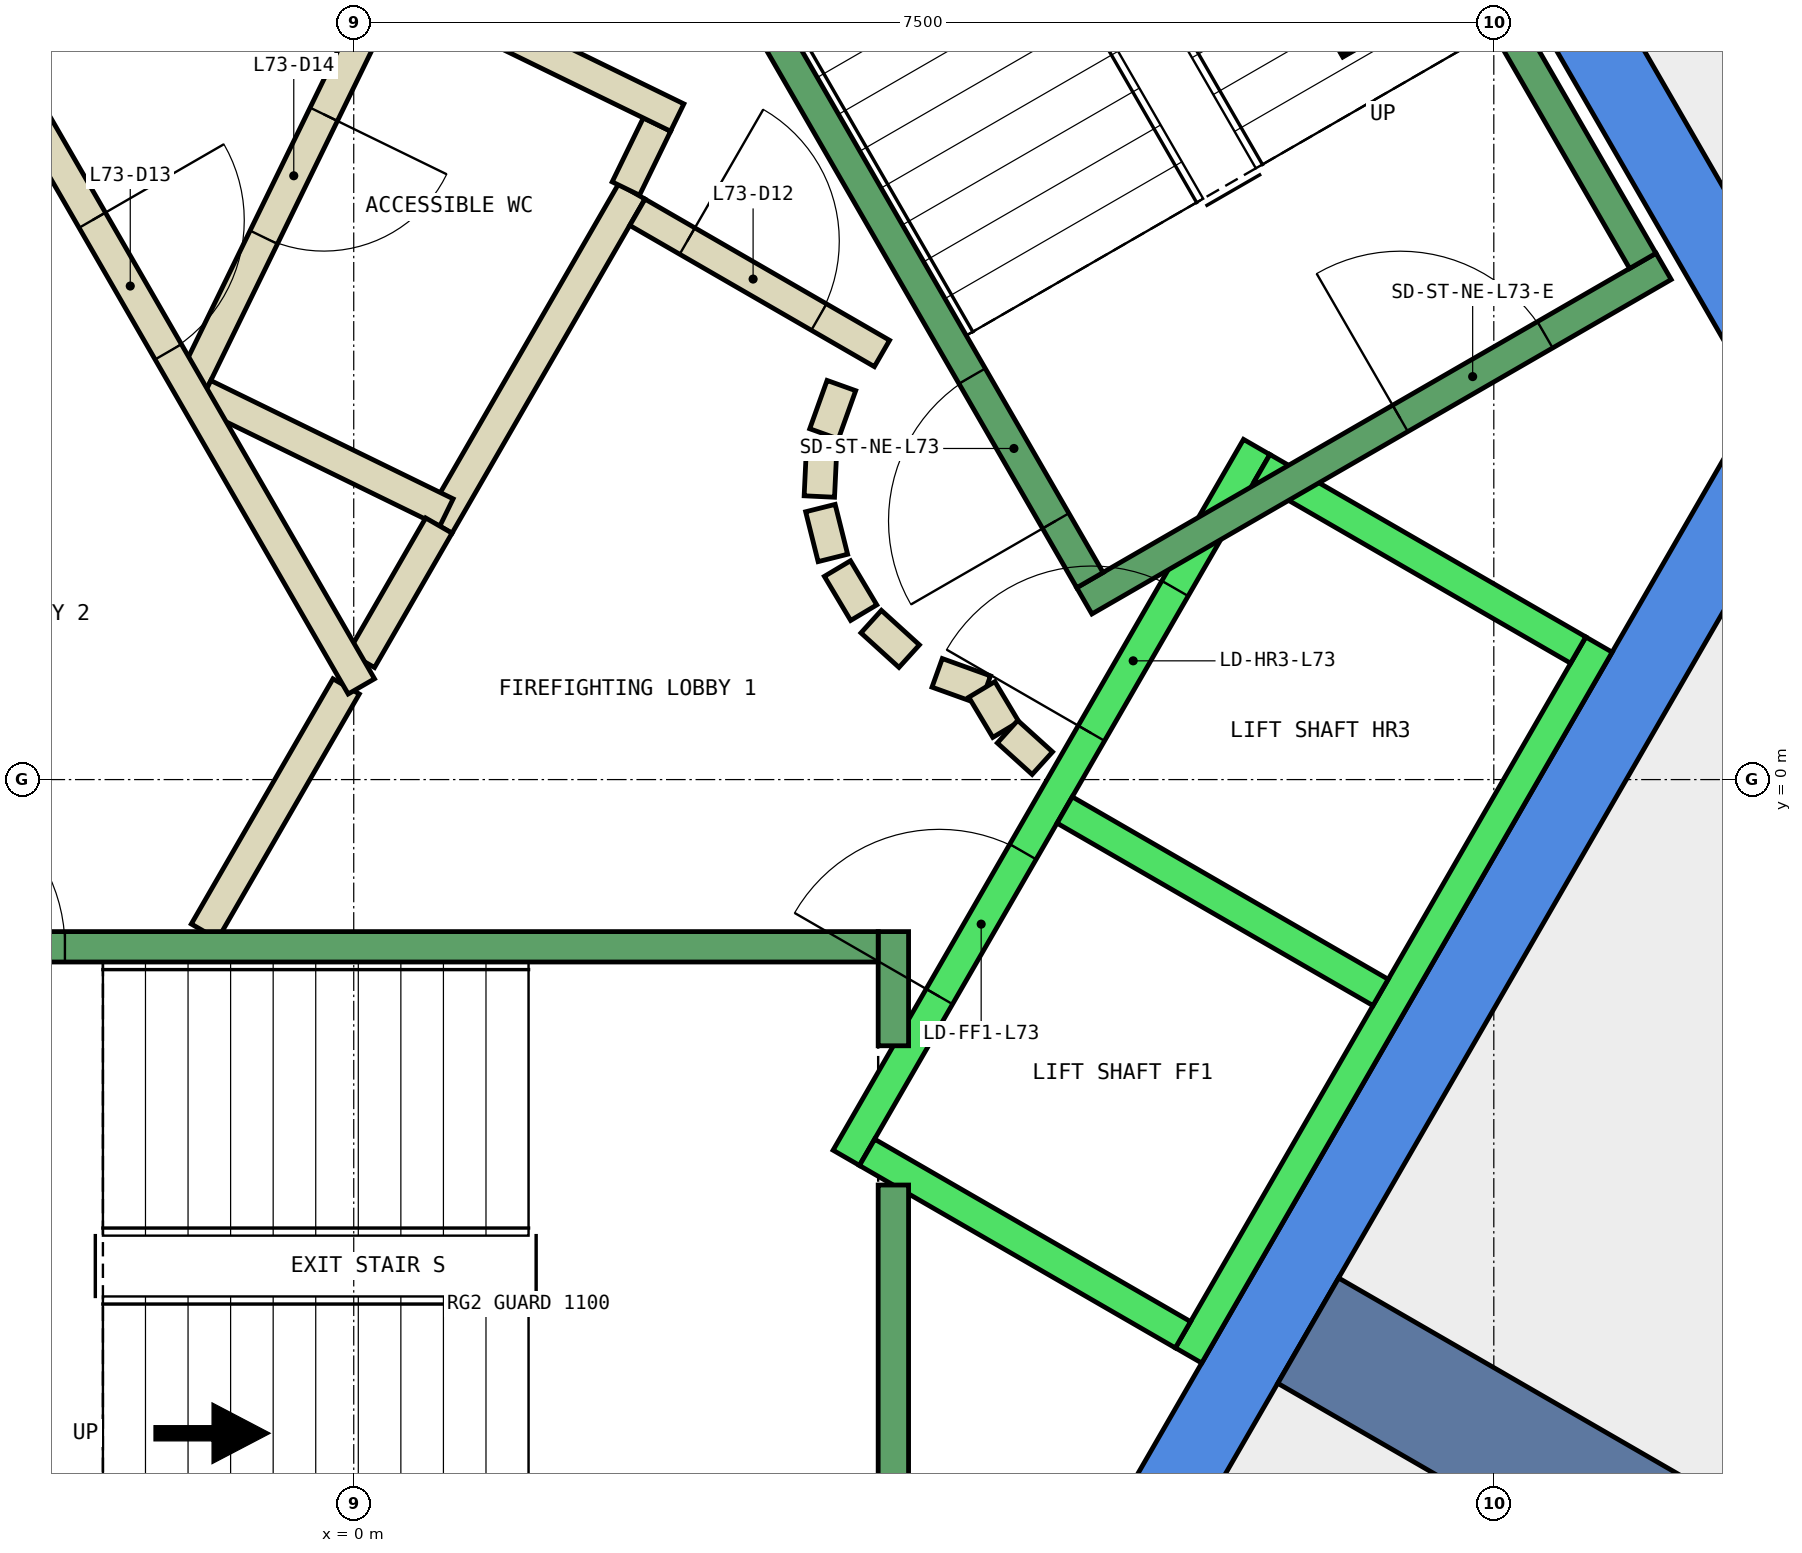
"""IFC4 building model, lengths in metres.
Left out: names, types, materials, properties, quantities, classifications, styles, units other than length and angle.
Written with IfcOpenShell. Run it as: python <this file> out.ifc"""

import sys

from ifc_helpers import new_model, si_unit, direction, frame, frame_2d, origin, place, context, subcontext, project, spatial, polyline, rectangle, outline, extrude, element, fill, save


model = new_model("IFC4")
c1 = context("Model", 3, precision=1e-05, world=origin(), true_north=direction((0.0, 1.0)))
c2 = subcontext(c1, "Body", "Model", "MODEL_VIEW")
j1 = project(units=[si_unit("LENGTHUNIT", "METRE"), si_unit("PLANEANGLEUNIT", "RADIAN")], contexts=[c1])
p1 = place(None, origin())
s1 = spatial("IfcSite", under=j1, at=p1, CompositionType="ELEMENT")
p2 = place(p1, origin())
s2 = spatial("IfcBuilding", under=s1, at=p2, CompositionType="ELEMENT")
p3 = place(p2, frame((0.0, 0.0, 311.6)))
s3 = spatial("IfcBuildingStorey", under=s2, at=p3, CompositionType="ELEMENT", Elevation=311.6)
p4 = place(p3, frame((0.0, 0.0, -0.34)))
e1 = element("IfcWall", 1, at=p4, inside=s3, PredefinedType="SHEAR", context=c2, shape_type="SweptSolid", body=[
    extrude(outline(polyline([(5.486, 9.998), (5.053, 9.748), (9.238, 2.5), (9.815, 2.5), (5.486, 9.998)])), origin(), (0.0, 0.0, 1.0), 3.6),
])
p5 = place(p3, frame((0.0, 0.0, -0.34)))
e2 = element("IfcWall", 2, at=p5, inside=s3, PredefinedType="SHEAR", context=c2, shape_type="SweptSolid", body=[
    extrude(outline(polyline([(4.907, -6.0), (9.815, 2.5), (9.238, 2.5), (4.619, -5.5), (4.907, -6.0)])), origin(), (0.0, 0.0, 1.0), 3.6),
])
p6 = place(p3, frame((6.279, -3.625, -0.34), z_axis=(0.0, 0.0, 1.0), x_axis=(0.866017533419, -0.500013631625, 0.0)))
e3 = element("IfcWall", 3, at=p6, inside=s3, PredefinedType="SHEAR", context=c2, shape_type="SweptSolid", body=[
    extrude(rectangle(XDim=9.0, YDim=0.8, at=frame_2d((4.5, 0.0))), origin(), (0.0, 0.0, 1.0), 3.6),
])
p7 = place(p3, frame((0.56, 1.671, 0.0), z_axis=(0.0, 0.0, 1.0), x_axis=(0.500008334558, 0.866020591771, 0.0)))
e4 = element("IfcWall", 4, at=p7, inside=s3, PredefinedType="PARTITIONING", context=c2, shape_type="SweptSolid", body=[
    extrude(rectangle(XDim=2.538, YDim=0.2, at=frame_2d((1.269, 0.0))), origin(), (0.0, 0.0, 1.0), 3.26),
])
p8 = place(p3, frame((1.79, 3.888, 0.0), z_axis=(0.0, 0.0, 1.0), x_axis=(0.437807406823, 0.899068781869, 0.0)))
e5 = element("IfcWall", 5, at=p8, inside=s3, PredefinedType="PARTITIONING", context=c2, shape_type="SweptSolid", body=[
    extrude(rectangle(XDim=0.469, YDim=0.2, at=frame_2d((0.234, 0.0))), origin(), (0.0, 0.0, 1.0), 3.26),
])
p9 = place(p3, frame((2.128, 4.355, 0.0), z_axis=(0.0, 0.0, 1.0), x_axis=(-0.898876404494, 0.438202247191, 0.0)))
e6 = element("IfcWall", 6, at=p9, inside=s3, PredefinedType="PARTITIONING", context=c2, shape_type="SweptSolid", body=[
    extrude(rectangle(XDim=1.999, YDim=0.2, at=frame_2d((1.0, 0.0))), origin(), (0.0, 0.0, 1.0), 3.26),
])
p10 = place(p3, frame((0.285, 5.365, 0.0), z_axis=(0.0, 0.0, 1.0), x_axis=(-0.43840190643, -0.898779043168, 0.0)))
e7 = element("IfcWall", 7, at=p10, inside=s3, PredefinedType="PARTITIONING", context=c2, shape_type="SweptSolid", body=[
    extrude(rectangle(XDim=3.1, YDim=0.2, at=frame_2d((1.55, 0.0))), origin(), (0.0, 0.0, 1.0), 3.26),
])
p11 = place(p10, frame((1.1, 0.0, 0.0)))
e8 = element("IfcOpeningElement", 8, at=p11, cuts=e7, PredefinedType="OPENING", context=c2, shape_type="SweptSolid", body=[
    extrude(rectangle(XDim=0.9, YDim=2.1, at=frame_2d((0.45, 1.05))), frame((0.0, 0.11, 0.0), z_axis=(0.0, -1.0, 0.0), x_axis=(1.0, 0.0, 0.0)), (0.0, 0.0, 1.0), 0.22),
])
p12 = place(p3, frame((-0.984, 2.535, 0.0), z_axis=(0.0, 0.0, 1.0), x_axis=(0.898707583217, -0.438548378025, 0.0)))
e9 = element("IfcWall", 9, at=p12, inside=s3, PredefinedType="PARTITIONING", context=c2, shape_type="SweptSolid", body=[
    extrude(rectangle(XDim=1.774, YDim=0.2, at=frame_2d((0.887, 0.0))), origin(), (0.0, 0.0, 1.0), 3.26),
])
p13 = place(p3, frame((8.588, 9.665, 0.0), z_axis=(0.0, 0.0, 1.0), x_axis=(0.499946799636, -0.86605611685, 0.0)))
e10 = element("IfcWall", 10, at=p13, inside=s3, PredefinedType="PARTITIONING", context=c2, shape_type="SweptSolid", body=[
    extrude(rectangle(XDim=8.227, YDim=0.2, at=frame_2d((4.114, 0.0))), origin(), (0.0, 0.0, 1.0), 3.26),
])
p14 = place(p13, frame((3.613, 0.0, 0.0)))
e11 = element("IfcOpeningElement", 11, at=p14, cuts=e10, PredefinedType="OPENING", context=c2, shape_type="SweptSolid", body=[
    extrude(rectangle(XDim=1.0, YDim=2.1, at=frame_2d((0.5, 1.05))), frame((0.0, 0.11, 0.0), z_axis=(0.0, -1.0, 0.0), x_axis=(1.0, 0.0, 0.0)), (0.0, 0.0, 1.0), 0.22),
])
p15 = place(p3, frame((-0.982, -1.0, 0.0), z_axis=(0.0, 0.0, 1.0), x_axis=(0.50024047865, 0.865886518847, 0.0)))
e12 = element("IfcWall", 12, at=p15, inside=s3, PredefinedType="PARTITIONING", context=c2, shape_type="SweptSolid", body=[
    extrude(rectangle(XDim=1.863, YDim=0.2, at=frame_2d((0.931, 0.0))), origin(), (0.0, 0.0, 1.0), 3.26),
])
p16 = place(p3, frame((0.05, 0.787, 0.0), z_axis=(0.0, 0.0, 1.0), x_axis=(0.499819111317, 0.866129814729, 0.0)))
e13 = element("IfcWall", 13, at=p16, inside=s3, PredefinedType="PARTITIONING", context=c2, shape_type="SweptSolid", body=[
    extrude(rectangle(XDim=1.021, YDim=0.2, at=frame_2d((0.51, 0.0))), origin(), (0.0, 0.0, 1.0), 3.26),
])
p17 = place(p3, frame((1.866, 3.732, 0.0), z_axis=(0.0, 0.0, 1.0), x_axis=(0.866043361281, -0.499968895414, 0.0)))
e14 = element("IfcWall", 14, at=p17, inside=s3, PredefinedType="PARTITIONING", context=c2, shape_type="SweptSolid", body=[
    extrude(rectangle(XDim=1.858, YDim=0.2, at=frame_2d((0.929, 0.0))), origin(), (0.0, 0.0, 1.0), 3.26),
])
p18 = place(p17, frame((0.379, 0.0, 0.0)))
e15 = element("IfcOpeningElement", 15, at=p18, cuts=e14, PredefinedType="OPENING", context=c2, shape_type="SweptSolid", body=[
    extrude(rectangle(XDim=1.0, YDim=2.1, at=frame_2d((0.5, 1.05))), frame((0.0, 0.11, 0.0), z_axis=(0.0, -1.0, 0.0), x_axis=(1.0, 0.0, 0.0)), (0.0, 0.0, 1.0), 0.22),
])
p19 = place(p3, frame((3.208, 2.592, 0.0), z_axis=(0.0, 0.0, 1.0), x_axis=(-0.337388820924, -0.941365382578, 0.0)))
e16 = element("IfcWall", 16, at=p19, inside=s3, PredefinedType="PARTITIONING", context=c2, shape_type="SweptSolid", body=[
    extrude(rectangle(XDim=0.338, YDim=0.2, at=frame_2d((0.169, 0.0))), origin(), (0.0, 0.0, 1.0), 3.26),
])
p20 = place(p3, frame((3.079, 2.199, 0.0), z_axis=(0.0, 0.0, 1.0), x_axis=(-0.047771483479, -0.998858290933, 0.0)))
e17 = element("IfcWall", 17, at=p20, inside=s3, PredefinedType="PARTITIONING", context=c2, shape_type="SweptSolid", body=[
    extrude(rectangle(XDim=0.337, YDim=0.2, at=frame_2d((0.169, 0.0))), origin(), (0.0, 0.0, 1.0), 3.26),
])
p21 = place(p3, frame((3.07, 1.786, 0.0), z_axis=(0.0, 0.0, 1.0), x_axis=(0.242705583207, -0.970099994784, 0.0)))
e18 = element("IfcWall", 18, at=p21, inside=s3, PredefinedType="PARTITIONING", context=c2, shape_type="SweptSolid", body=[
    extrude(rectangle(XDim=0.338, YDim=0.2, at=frame_2d((0.169, 0.0))), origin(), (0.0, 0.0, 1.0), 3.26),
])
for number, where, z_axis, x_axis in (
    (19, (3.182, 1.388, 0.0), (0.0, 0.0, 1.0), (0.512, -0.859, 0.0)),
    (20, (3.404, 1.039, 0.0), (0.0, 0.0, 1.0), (0.74, -0.672, 0.0)),
):
    element("IfcWall", number, at=place(p3, frame(where, z_axis=z_axis, x_axis=x_axis)), inside=s3, PredefinedType="PARTITIONING", context=c2, shape_type="SweptSolid", body=[
        extrude(rectangle(XDim=0.338, YDim=0.2, at=frame_2d((0.169, 0.0))), origin(), (0.0, 0.0, 1.0), 3.26),
    ])
p22 = place(p3, frame((3.838, 0.702, 0.0), z_axis=(0.0, 0.0, 1.0), x_axis=(0.941035081519, -0.338308993895, 0.0)))
e21 = element("IfcWall", 21, at=p22, inside=s3, PredefinedType="PARTITIONING", context=c2, shape_type="SweptSolid", body=[
    extrude(rectangle(XDim=0.337, YDim=0.2, at=frame_2d((0.168, 0.0))), origin(), (0.0, 0.0, 1.0), 3.26),
])
p23 = place(p3, frame((4.132, 0.593, 0.0), z_axis=(0.0, 0.0, 1.0), x_axis=(0.513561617048, -0.858052717201, 0.0)))
e22 = element("IfcWall", 22, at=p23, inside=s3, PredefinedType="PARTITIONING", context=c2, shape_type="SweptSolid", body=[
    extrude(rectangle(XDim=0.308, YDim=0.2, at=frame_2d((0.154, 0.0))), origin(), (0.0, 0.0, 1.0), 3.26),
])
p24 = place(p3, frame((4.301, 0.315, 0.0), z_axis=(0.0, 0.0, 1.0), x_axis=(0.741798017506, -0.670623367639, 0.0)))
e23 = element("IfcWall", 23, at=p24, inside=s3, PredefinedType="PARTITIONING", context=c2, shape_type="SweptSolid", body=[
    extrude(rectangle(XDim=0.309, YDim=0.2, at=frame_2d((0.154, 0.0))), origin(), (0.0, 0.0, 1.0), 3.26),
])
p25 = place(p3, frame((-2.54, 5.1, 0.0), z_axis=(0.0, 0.0, 1.0), x_axis=(0.499925051871, -0.866068670783, 0.0)))
e24 = element("IfcWall", 24, at=p25, inside=s3, PredefinedType="PARTITIONING", context=c2, shape_type="SweptSolid", body=[
    extrude(rectangle(XDim=5.181, YDim=0.2, at=frame_2d((2.59, 0.0))), origin(), (0.0, 0.0, 1.0), 3.26),
])
p26 = place(p25, frame((1.64, 0.0, 0.0)))
e25 = element("IfcOpeningElement", 25, at=p26, cuts=e24, PredefinedType="OPENING", context=c2, shape_type="SweptSolid", body=[
    extrude(rectangle(XDim=1.0, YDim=2.1, at=frame_2d((0.5, 1.05))), frame((0.0, 0.11, 0.0), z_axis=(0.0, -1.0, 0.0), x_axis=(1.0, 0.0, 0.0)), (0.0, 0.0, 1.0), 0.22),
])
p27 = place(p3, frame((3.24, -2.488, 0.0), z_axis=(0.0, 0.0, 1.0), x_axis=(0.500034260056, 0.866005622828, 0.0)))
e26 = element("IfcWall", 26, at=p27, inside=s3, PredefinedType="STANDARD", context=c2, shape_type="SweptSolid", body=[
    extrude(rectangle(XDim=5.399, YDim=0.2, at=frame_2d((2.7, 0.0))), origin(), (0.0, 0.0, 1.0), 3.26),
])
p28 = place(p27, frame((3.225, 0.0, 0.0)))
e27 = element("IfcOpeningElement", 27, at=p28, cuts=e26, PredefinedType="OPENING", context=c2, shape_type="SweptSolid", body=[
    extrude(rectangle(XDim=1.1, YDim=2.1, at=frame_2d((0.55, 1.05))), frame((0.0, 0.11, 0.0), z_axis=(0.0, -1.0, 0.0), x_axis=(1.0, 0.0, 0.0)), (0.0, 0.0, 1.0), 0.22),
])
p29 = place(p27, frame((1.225, 0.0, 0.0)))
e28 = element("IfcOpeningElement", 28, at=p29, cuts=e26, PredefinedType="OPENING", context=c2, shape_type="SweptSolid", body=[
    extrude(rectangle(XDim=1.1, YDim=2.1, at=frame_2d((0.55, 1.05))), frame((0.0, 0.11, 0.0), z_axis=(0.0, -1.0, 0.0), x_axis=(1.0, 0.0, 0.0)), (0.0, 0.0, 1.0), 0.22),
])
p30 = place(p3, frame((5.492, -3.788, 0.0), z_axis=(0.0, 0.0, 1.0), x_axis=(0.500034260056, 0.866005622828, 0.0)))
e29 = element("IfcWall", 29, at=p30, inside=s3, PredefinedType="STANDARD", context=c2, shape_type="SweptSolid", body=[
    extrude(rectangle(XDim=5.399, YDim=0.2, at=frame_2d((2.7, 0.0))), origin(), (0.0, 0.0, 1.0), 3.26),
])
p31 = place(p3, frame((3.377, -2.452, 0.0), z_axis=(0.0, 0.0, 1.0), x_axis=(0.865955154139, -0.50012165622, 0.0)))
e30 = element("IfcWall", 30, at=p31, inside=s3, PredefinedType="STANDARD", context=c2, shape_type="SweptSolid", body=[
    extrude(rectangle(XDim=2.4, YDim=0.2, at=frame_2d((1.2, 0.0))), origin(), (0.0, 0.0, 1.0), 3.26),
])
for number, where, z_axis, x_axis in (
    (31, (4.677, -0.2, 0.0), (0.0, 0.0, 1.0), (0.866, -0.5, 0.0)),
    (32, (5.977, 2.052, 0.0), (0.0, 0.0, 1.0), (0.866, -0.5, 0.0)),
):
    element("IfcWall", number, at=place(p3, frame(where, z_axis=z_axis, x_axis=x_axis)), inside=s3, PredefinedType="STANDARD", context=c2, shape_type="SweptSolid", body=[
        extrude(rectangle(XDim=2.399, YDim=0.2, at=frame_2d((1.2, 0.0))), origin(), (0.0, 0.0, 1.0), 3.26),
    ])
p32 = place(p3, frame((3.55, -2.667, 0.0), z_axis=(0.0, 0.0, 1.0), x_axis=(0.0, -1.0, 0.0)))
e33 = element("IfcWall", 33, at=p32, inside=s3, PredefinedType="STANDARD", context=c2, shape_type="SweptSolid", body=[
    extrude(rectangle(XDim=2.733, YDim=0.2, at=frame_2d((1.366, 0.0))), origin(), (0.0, 0.0, 1.0), 3.26),
])
p33 = place(p3, frame((3.55, -1.0, 0.0), z_axis=(0.0, 0.0, 1.0), x_axis=(0.0, -1.0, 0.0)))
e34 = element("IfcWall", 34, at=p33, inside=s3, PredefinedType="STANDARD", context=c2, shape_type="SweptSolid", body=[
    extrude(rectangle(XDim=0.751, YDim=0.2, at=frame_2d((0.375, 0.0))), origin(), (0.0, 0.0, 1.0), 3.26),
])
p34 = place(p3, frame((-3.45, -1.1, 0.0), z_axis=(0.0, 0.0, 1.0), x_axis=(1.0, 0.0, 0.0)))
e35 = element("IfcWall", 35, at=p34, inside=s3, PredefinedType="STANDARD", context=c2, shape_type="SweptSolid", body=[
    extrude(rectangle(XDim=6.9, YDim=0.2, at=frame_2d((3.45, 0.0))), origin(), (0.0, 0.0, 1.0), 3.26),
])
p35 = place(p34, frame((0.45, 0.0, 0.0)))
e36 = element("IfcOpeningElement", 36, at=p35, cuts=e35, PredefinedType="OPENING", context=c2, shape_type="SweptSolid", body=[
    extrude(rectangle(XDim=1.1, YDim=2.2, at=frame_2d((0.55, 1.1))), frame((0.0, 0.11, 0.0), z_axis=(0.0, -1.0, 0.0), x_axis=(1.0, 0.0, 0.0)), (0.0, 0.0, 1.0), 0.22),
])
p36 = place(p3, frame((4.806, 1.176, 0.0), z_axis=(0.0, 0.0, 1.0), x_axis=(0.866059941101, 0.499940174841, 0.0)))
e37 = element("IfcWall", 37, at=p36, inside=s3, PredefinedType="STANDARD", context=c2, shape_type="SweptSolid", body=[
    extrude(rectangle(XDim=4.4, YDim=0.2, at=frame_2d((2.2, 0.0))), origin(), (0.0, 0.0, 1.0), 3.26),
])
p37 = place(p36, frame((2.4, 0.0, 0.0)))
e38 = element("IfcOpeningElement", 38, at=p37, cuts=e37, PredefinedType="OPENING", context=c2, shape_type="SweptSolid", body=[
    extrude(rectangle(XDim=1.1, YDim=2.2, at=frame_2d((0.55, 1.1))), frame((0.0, 0.11, 0.0), z_axis=(0.0, -1.0, 0.0), x_axis=(1.0, 0.0, 0.0)), (0.0, 0.0, 1.0), 0.22),
])
p38 = place(p3, frame((4.843, 1.312, 0.0), z_axis=(0.0, 0.0, 1.0), x_axis=(-0.499963383562, 0.866046543262, 0.0)))
e39 = element("IfcWall", 39, at=p38, inside=s3, PredefinedType="STANDARD", context=c2, shape_type="SweptSolid", body=[
    extrude(rectangle(XDim=6.9, YDim=0.2, at=frame_2d((3.45, 0.0))), origin(), (0.0, 0.0, 1.0), 3.26),
])
p39 = place(p38, frame((0.45, 0.0, 0.0)))
e40 = element("IfcOpeningElement", 40, at=p39, cuts=e39, PredefinedType="OPENING", context=c2, shape_type="SweptSolid", body=[
    extrude(rectangle(XDim=1.1, YDim=2.2, at=frame_2d((0.55, 1.1))), frame((0.0, 0.11, 0.0), z_axis=(0.0, -1.0, 0.0), x_axis=(1.0, 0.0, 0.0)), (0.0, 0.0, 1.0), 0.22),
])
p40 = place(p3, frame((8.48, 3.412, 0.0), z_axis=(0.0, 0.0, 1.0), x_axis=(-0.499978703459, 0.866037698999, 0.0)))
e41 = element("IfcWall", 41, at=p40, inside=s3, PredefinedType="STANDARD", context=c2, shape_type="SweptSolid", body=[
    extrude(rectangle(XDim=6.9, YDim=0.2, at=frame_2d((3.45, 0.0))), origin(), (0.0, 0.0, 1.0), 3.26),
])
p41 = place(p3, frame((-1.393, 7.288, 0.0), z_axis=(0.0, 0.0, 1.0), x_axis=(-0.499963383562, -0.866046543262, 0.0)))
e42 = element("IfcWall", 42, at=p41, inside=s3, PredefinedType="STANDARD", context=c2, shape_type="SweptSolid", body=[
    extrude(rectangle(XDim=6.9, YDim=0.2, at=frame_2d((3.45, 0.0))), origin(), (0.0, 0.0, 1.0), 3.26),
])
p42 = place(p41, frame((0.45, 0.0, 0.0)))
e43 = element("IfcOpeningElement", 43, at=p42, cuts=e42, PredefinedType="OPENING", context=c2, shape_type="SweptSolid", body=[
    extrude(rectangle(XDim=1.1, YDim=2.2, at=frame_2d((0.55, 1.1))), frame((0.0, 0.11, 0.0), z_axis=(0.0, -1.0, 0.0), x_axis=(1.0, 0.0, 0.0)), (0.0, 0.0, 1.0), 0.22),
])
p43 = place(p18, origin())
e44 = element("IfcDoor", 44, at=p43, inside=s3, OperationType="SINGLE_SWING_LEFT", PredefinedType="DOOR", context=c2, shape_type="SweptSolid", body=[
    extrude(rectangle(XDim=1.0, YDim=2.1, at=frame_2d((0.5, 1.05))), frame((0.0, 0.025, 0.0), z_axis=(0.0, -1.0, 0.0), x_axis=(1.0, 0.0, 0.0)), (0.0, 0.0, 1.0), 0.05),
])
fill(e15, e44)
p44 = place(p26, origin())
e45 = element("IfcDoor", 45, at=p44, inside=s3, OperationType="SINGLE_SWING_RIGHT", PredefinedType="DOOR", context=c2, shape_type="SweptSolid", body=[
    extrude(rectangle(XDim=1.0, YDim=2.1, at=frame_2d((0.5, 1.05))), frame((0.0, 0.025, 0.0), z_axis=(0.0, -1.0, 0.0), x_axis=(1.0, 0.0, 0.0)), (0.0, 0.0, 1.0), 0.05),
])
fill(e25, e45)
p45 = place(p11, origin())
e46 = element("IfcDoor", 46, at=p45, inside=s3, OperationType="SINGLE_SWING_RIGHT", PredefinedType="DOOR", context=c2, shape_type="SweptSolid", body=[
    extrude(rectangle(XDim=0.9, YDim=2.1, at=frame_2d((0.45, 1.05))), frame((0.0, 0.025, 0.0), z_axis=(0.0, -1.0, 0.0), x_axis=(1.0, 0.0, 0.0)), (0.0, 0.0, 1.0), 0.05),
])
fill(e8, e46)
p46 = place(p28, origin())
e47 = element("IfcDoor", 47, at=p46, inside=s3, OperationType="SLIDING_TO_LEFT", PredefinedType="DOOR", context=c2, shape_type="SweptSolid", body=[
    extrude(rectangle(XDim=1.1, YDim=2.1, at=frame_2d((0.55, 1.05))), frame((0.0, 0.025, 0.0), z_axis=(0.0, -1.0, 0.0), x_axis=(1.0, 0.0, 0.0)), (0.0, 0.0, 1.0), 0.05),
])
fill(e27, e47)
p47 = place(p29, origin())
e48 = element("IfcDoor", 48, at=p47, inside=s3, OperationType="SLIDING_TO_LEFT", PredefinedType="DOOR", context=c2, shape_type="SweptSolid", body=[
    extrude(rectangle(XDim=1.1, YDim=2.1, at=frame_2d((0.55, 1.05))), frame((0.0, 0.025, 0.0), z_axis=(0.0, -1.0, 0.0), x_axis=(1.0, 0.0, 0.0)), (0.0, 0.0, 1.0), 0.05),
])
fill(e28, e48)
p48 = place(p35, origin())
e49 = element("IfcDoor", 49, at=p48, inside=s3, OperationType="SINGLE_SWING_LEFT", PredefinedType="DOOR", context=c2, shape_type="SweptSolid", body=[
    extrude(rectangle(XDim=1.1, YDim=2.2, at=frame_2d((0.55, 1.1))), frame((0.0, 0.025, 0.0), z_axis=(0.0, -1.0, 0.0), x_axis=(1.0, 0.0, 0.0)), (0.0, 0.0, 1.0), 0.05),
])
fill(e36, e49)
p49 = place(p39, origin())
e50 = element("IfcDoor", 50, at=p49, inside=s3, OperationType="SINGLE_SWING_LEFT", PredefinedType="DOOR", context=c2, shape_type="SweptSolid", body=[
    extrude(rectangle(XDim=1.1, YDim=2.2, at=frame_2d((0.55, 1.1))), frame((0.0, 0.025, 0.0), z_axis=(0.0, -1.0, 0.0), x_axis=(1.0, 0.0, 0.0)), (0.0, 0.0, 1.0), 0.05),
])
fill(e40, e50)
p50 = place(p37, origin())
e51 = element("IfcDoor", 51, at=p50, inside=s3, OperationType="SINGLE_SWING_LEFT", PredefinedType="DOOR", context=c2, shape_type="SweptSolid", body=[
    extrude(rectangle(XDim=1.1, YDim=2.2, at=frame_2d((0.55, 1.1))), frame((0.0, 0.025, 0.0), z_axis=(0.0, -1.0, 0.0), x_axis=(1.0, 0.0, 0.0)), (0.0, 0.0, 1.0), 0.05),
])
fill(e38, e51)
save(model, sys.argv[1])
